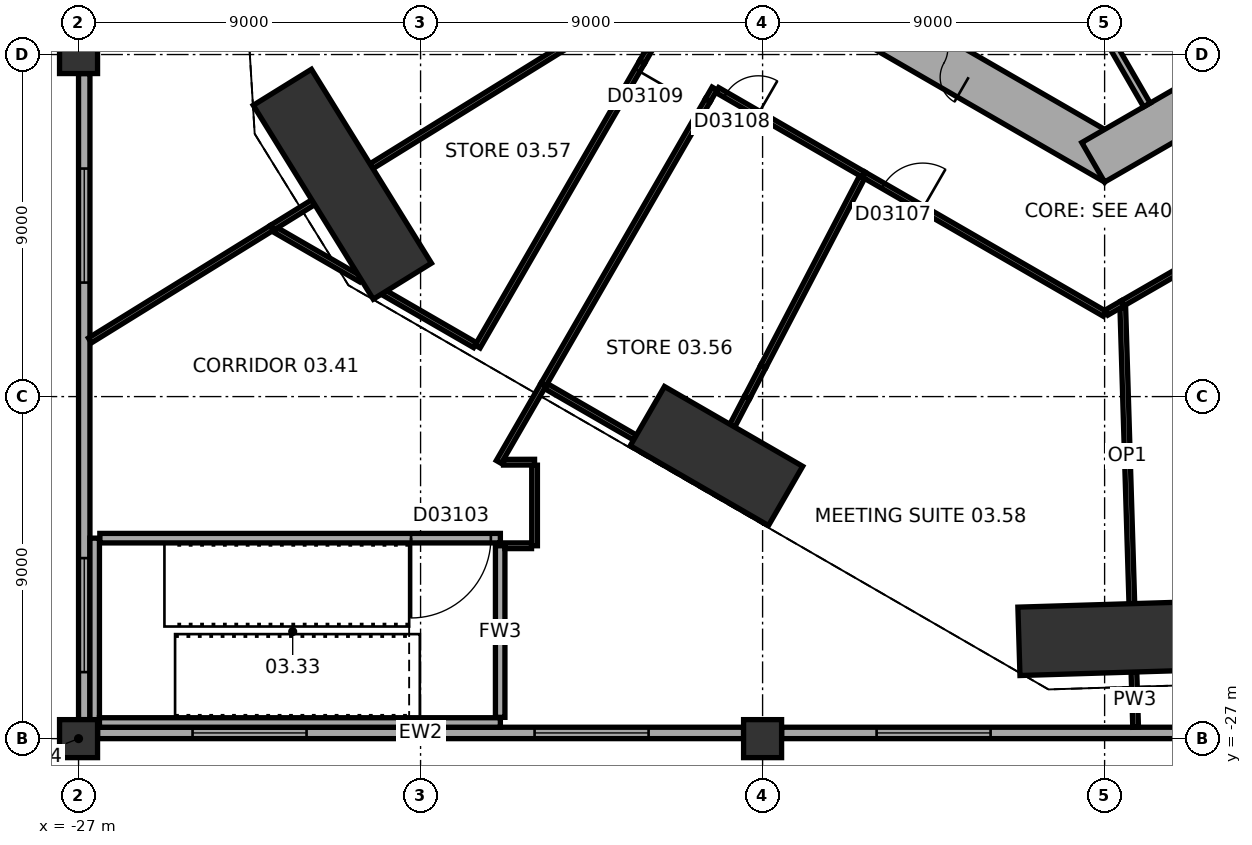
"""IFC4 building model, lengths in metres.
Left out: names, types, materials, properties, quantities, classifications, styles, units other than length and angle.
Written with IfcOpenShell. Run it as: python <this file> out.ifc"""

import sys

from ifc_helpers import new_model, si_unit, direction, frame, frame_2d, origin, origin_2d, place, context, subcontext, project, spatial, rectangle, extrude, element, fill, save


model = new_model("IFC4")
c1 = context("Model", 3, precision=1e-05, world=origin(), true_north=direction((0.0, 1.0)))
c2 = subcontext(c1, "Body", "Model", "MODEL_VIEW")
j1 = project(units=[si_unit("LENGTHUNIT", "METRE"), si_unit("PLANEANGLEUNIT", "RADIAN")], contexts=[c1])
p1 = place(None, origin())
s1 = spatial("IfcSite", under=j1, at=p1, CompositionType="ELEMENT")
p2 = place(p1, origin())
s2 = spatial("IfcBuilding", under=s1, at=p2, CompositionType="ELEMENT")
p3 = place(p2, frame((0.0, 0.0, 21.0)))
s3 = spatial("IfcBuildingStorey", under=s2, at=p3, CompositionType="ELEMENT", Elevation=21.0)
p4 = place(p3, frame((-20.058, -12.413, 0.0), z_axis=(0.0, 0.0, 1.0), x_axis=(0.526202050444, -0.850359572245, 0.0)))
e1 = element("IfcColumn", 1, at=p4, inside=s3, PredefinedType="COLUMN", context=c2, shape_type="SweptSolid", body=[
    extrude(rectangle(XDim=6.0, YDim=1.8, at=origin_2d()), origin(), (0.0, 0.0, 1.0), 8.0),
])
p5 = place(p3, frame((-10.213, -19.564, 0.0), z_axis=(0.0, 0.0, 1.0), x_axis=(0.866028021766, -0.499995465495, 0.0)))
e2 = element("IfcColumn", 2, at=p5, inside=s3, PredefinedType="COLUMN", context=c2, shape_type="SweptSolid", body=[
    extrude(rectangle(XDim=4.2, YDim=1.8, at=origin_2d()), origin(), (0.0, 0.0, 1.0), 8.0),
])
p6 = place(p3, frame((0.744, -24.348, 0.0), z_axis=(0.0, 0.0, 1.0), x_axis=(0.999533484231, 0.03054200224, 0.0)))
e3 = element("IfcColumn", 3, at=p6, inside=s3, PredefinedType="COLUMN", context=c2, shape_type="SweptSolid", body=[
    extrude(rectangle(XDim=6.0, YDim=1.8, at=origin_2d()), origin(), (0.0, 0.0, 1.0), 8.0),
])
for number, where, z_axis, x_axis in (
    (4, (-27.0, -27.0, 0.0), (0.0, 0.0, 1.0), (1.0, 0.0, 0.0)),
    (5, (-27.0, -9.0, 0.0), (0.0, 0.0, 1.0), (1.0, 0.0, 0.0)),
    (6, (-9.0, -27.0, 0.0), (0.0, 0.0, 1.0), (1.0, 0.0, 0.0)),
):
    element("IfcColumn", number, at=place(p3, frame(where, z_axis=z_axis, x_axis=x_axis)), inside=s3, PredefinedType="COLUMN", context=c2, shape_type="SweptSolid", body=[
        extrude(rectangle(XDim=1.0, YDim=1.0, at=origin_2d()), origin(), (0.0, 0.0, 1.0), 8.0),
    ])
p7 = place(p3, frame((-10.4, -5.658, 0.0), z_axis=(0.0, 0.0, 1.0), x_axis=(0.866021384402, -0.500006961711, 0.0)))
e7 = element("IfcWall", 7, at=p7, inside=s3, PredefinedType="SHEAR", context=c2, shape_type="SweptSolid", body=[
    extrude(rectangle(XDim=12.355, YDim=1.2, at=frame_2d((6.178, 0.0))), origin(), (0.0, 0.0, 1.0), 8.0),
])
p8 = place(p7, frame((6.378, 0.0, 0.0)))
e8 = element("IfcOpeningElement", 8, at=p8, cuts=e7, PredefinedType="OPENING", context=c2, shape_type="SweptSolid", body=[
    extrude(rectangle(XDim=1.5, YDim=2.1, at=frame_2d((0.75, 1.05))), frame((0.0, 0.61, 0.0), z_axis=(0.0, -1.0, 0.0), x_axis=(1.0, 0.0, 0.0)), (0.0, 0.0, 1.0), 1.22),
])
p9 = place(p7, frame((3.228, 0.0, 0.0)))
e9 = element("IfcOpeningElement", 9, at=p9, cuts=e7, PredefinedType="OPENING", context=c2, shape_type="SweptSolid", body=[
    extrude(rectangle(XDim=0.9, YDim=2.1, at=frame_2d((0.45, 1.05))), frame((0.0, 0.61, 0.0), z_axis=(0.0, -1.0, 0.0), x_axis=(1.0, 0.0, 0.0)), (0.0, 0.0, 1.0), 1.22),
])
p10 = place(p3, frame((-0.3, -11.836, 0.0), z_axis=(0.0, 0.0, 1.0), x_axis=(0.866021384402, 0.500006961711, 0.0)))
e10 = element("IfcWall", 10, at=p10, inside=s3, PredefinedType="SHEAR", context=c2, shape_type="SweptSolid", body=[
    extrude(rectangle(XDim=12.355, YDim=1.2, at=frame_2d((6.178, 0.0))), origin(), (0.0, 0.0, 1.0), 8.0),
])
p11 = place(p10, frame((4.128, 0.0, 0.0)))
e11 = element("IfcOpeningElement", 11, at=p11, cuts=e10, PredefinedType="OPENING", context=c2, shape_type="SweptSolid", body=[
    extrude(rectangle(XDim=0.9, YDim=2.1, at=frame_2d((0.45, 1.05))), frame((0.0, 0.61, 0.0), z_axis=(0.0, -1.0, 0.0), x_axis=(1.0, 0.0, 0.0)), (0.0, 0.0, 1.0), 1.22),
])
p12 = place(p10, frame((7.928, 0.0, 0.0)))
e12 = element("IfcOpeningElement", 12, at=p12, cuts=e10, PredefinedType="OPENING", context=c2, shape_type="SweptSolid", body=[
    extrude(rectangle(XDim=1.1, YDim=2.1, at=frame_2d((0.55, 1.05))), frame((0.0, 0.61, 0.0), z_axis=(0.0, -1.0, 0.0), x_axis=(1.0, 0.0, 0.0)), (0.0, 0.0, 1.0), 1.22),
])
p13 = place(p3, frame((-26.5, -26.85, 0.0), z_axis=(0.0, 0.0, 1.0), x_axis=(1.0, 0.0, 0.0)))
e13 = element("IfcWall", 13, at=p13, inside=s3, PredefinedType="STANDARD", context=c2, shape_type="SweptSolid", body=[
    extrude(rectangle(XDim=17.0, YDim=0.3, at=frame_2d((8.5, 0.0))), origin(), (0.0, 0.0, 1.0), 6.5),
])
p14 = place(p13, frame((2.5, 0.0, 1.0)))
e14 = element("IfcOpeningElement", 14, at=p14, cuts=e13, PredefinedType="OPENING", context=c2, shape_type="SweptSolid", body=[
    extrude(rectangle(XDim=3.0, YDim=4.0, at=frame_2d((1.5, 2.0))), frame((0.0, 0.16, 0.0), z_axis=(0.0, -1.0, 0.0), x_axis=(1.0, 0.0, 0.0)), (0.0, 0.0, 1.0), 0.32),
])
p15 = place(p13, frame((11.5, 0.0, 1.0)))
e15 = element("IfcOpeningElement", 15, at=p15, cuts=e13, PredefinedType="OPENING", context=c2, shape_type="SweptSolid", body=[
    extrude(rectangle(XDim=3.0, YDim=4.0, at=frame_2d((1.5, 2.0))), frame((0.0, 0.16, 0.0), z_axis=(0.0, -1.0, 0.0), x_axis=(1.0, 0.0, 0.0)), (0.0, 0.0, 1.0), 0.32),
])
p16 = place(p3, frame((-8.5, -26.85, 0.0), z_axis=(0.0, 0.0, 1.0), x_axis=(1.0, 0.0, 0.0)))
e16 = element("IfcWall", 16, at=p16, inside=s3, PredefinedType="STANDARD", context=c2, shape_type="SweptSolid", body=[
    extrude(rectangle(XDim=17.0, YDim=0.3, at=frame_2d((8.5, 0.0))), origin(), (0.0, 0.0, 1.0), 6.5),
])
p17 = place(p16, frame((2.5, 0.0, 1.0)))
e17 = element("IfcOpeningElement", 17, at=p17, cuts=e16, PredefinedType="OPENING", context=c2, shape_type="SweptSolid", body=[
    extrude(rectangle(XDim=3.0, YDim=4.0, at=frame_2d((1.5, 2.0))), frame((0.0, 0.16, 0.0), z_axis=(0.0, -1.0, 0.0), x_axis=(1.0, 0.0, 0.0)), (0.0, 0.0, 1.0), 0.32),
])
p18 = place(p16, frame((11.5, 0.0, 1.0)))
e18 = element("IfcOpeningElement", 18, at=p18, cuts=e16, PredefinedType="OPENING", context=c2, shape_type="SweptSolid", body=[
    extrude(rectangle(XDim=3.0, YDim=4.0, at=frame_2d((1.5, 2.0))), frame((0.0, 0.16, 0.0), z_axis=(0.0, -1.0, 0.0), x_axis=(1.0, 0.0, 0.0)), (0.0, 0.0, 1.0), 0.32),
])
p19 = place(p3, frame((-26.85, -9.5, 0.0), z_axis=(0.0, 0.0, 1.0), x_axis=(0.0, -1.0, 0.0)))
e19 = element("IfcWall", 19, at=p19, inside=s3, PredefinedType="STANDARD", context=c2, shape_type="SweptSolid", body=[
    extrude(rectangle(XDim=17.0, YDim=0.3, at=frame_2d((8.5, 0.0))), origin(), (0.0, 0.0, 1.0), 6.5),
])
p20 = place(p19, frame((2.5, 0.0, 1.0)))
e20 = element("IfcOpeningElement", 20, at=p20, cuts=e19, PredefinedType="OPENING", context=c2, shape_type="SweptSolid", body=[
    extrude(rectangle(XDim=3.0, YDim=4.0, at=frame_2d((1.5, 2.0))), frame((0.0, 0.16, 0.0), z_axis=(0.0, -1.0, 0.0), x_axis=(1.0, 0.0, 0.0)), (0.0, 0.0, 1.0), 0.32),
])
p21 = place(p19, frame((12.75, 0.0, 1.0)))
e21 = element("IfcOpeningElement", 21, at=p21, cuts=e19, PredefinedType="OPENING", context=c2, shape_type="SweptSolid", body=[
    extrude(rectangle(XDim=3.0, YDim=4.0, at=frame_2d((1.5, 2.0))), frame((0.0, 0.16, 0.0), z_axis=(0.0, -1.0, 0.0), x_axis=(1.0, 0.0, 0.0)), (0.0, 0.0, 1.0), 0.32),
])
p22 = place(p3, frame((0.013, -8.422, 0.0), z_axis=(0.0, 0.0, 1.0), x_axis=(0.500077893725, -0.86598042715, 0.0)))
e22 = element("IfcWall", 22, at=p22, inside=s3, PredefinedType="PARTITIONING", context=c2, shape_type="SweptSolid", body=[
    extrude(rectangle(XDim=2.2, YDim=0.2, at=frame_2d((1.1, 0.0))), origin(), (0.0, 0.0, 1.0), 7.7),
])
p23 = place(p3, frame((-15.905, -26.44, 0.0), z_axis=(0.0, 0.0, 1.0), x_axis=(0.0, 1.0, 0.0)))
e23 = element("IfcWall", 23, at=p23, inside=s3, PredefinedType="SOLIDWALL", context=c2, shape_type="SweptSolid", body=[
    extrude(rectangle(XDim=4.515, YDim=0.25, at=frame_2d((2.257, 0.0))), origin(), (0.0, 0.0, 1.0), 7.7),
])
p24 = place(p3, frame((0.771, -25.248, 0.0), z_axis=(0.0, 0.0, 1.0), x_axis=(0.030584206332, -0.99953219374, 0.0)))
e24 = element("IfcWall", 24, at=p24, inside=s3, PredefinedType="PARTITIONING", context=c2, shape_type="SweptSolid", body=[
    extrude(rectangle(XDim=1.453, YDim=0.15, at=frame_2d((0.727, 0.0))), origin(), (0.0, 0.0, 1.0), 7.7),
])
p25 = place(p3, frame((-15.08, -21.925, 0.0), z_axis=(0.0, 0.0, 1.0), x_axis=(-1.0, 0.0, 0.0)))
e25 = element("IfcWall", 25, at=p25, inside=s3, PredefinedType="PARTITIONING", context=c2, shape_type="SweptSolid", body=[
    extrude(rectangle(XDim=0.7, YDim=0.15, at=frame_2d((0.35, 0.0))), origin(), (0.0, 0.0, 1.0), 7.7),
])
p26 = place(p3, frame((-26.44, -21.725, 0.0), z_axis=(0.0, 0.0, 1.0), x_axis=(1.0, 0.0, 0.0)))
e26 = element("IfcWall", 26, at=p26, inside=s3, PredefinedType="SOLIDWALL", context=c2, shape_type="SweptSolid", body=[
    extrude(rectangle(XDim=10.54, YDim=0.25, at=frame_2d((5.27, 0.0))), origin(), (0.0, 0.0, 1.0), 7.7),
])
p27 = place(p26, frame((8.19, 0.0, 0.0)))
e27 = element("IfcOpeningElement", 27, at=p27, cuts=e26, PredefinedType="OPENING", context=c2, shape_type="SweptSolid", body=[
    extrude(rectangle(XDim=2.1, YDim=2.4, at=frame_2d((1.05, 1.2))), frame((0.0, 0.135, 0.0), z_axis=(0.0, -1.0, 0.0), x_axis=(1.0, 0.0, 0.0)), (0.0, 0.0, 1.0), 0.27),
])
p28 = place(p3, frame((-15.0, -19.805, 0.0), z_axis=(0.0, 0.0, 1.0), x_axis=(0.0, -1.0, 0.0)))
e28 = element("IfcWall", 28, at=p28, inside=s3, PredefinedType="PARTITIONING", context=c2, shape_type="SweptSolid", body=[
    extrude(rectangle(XDim=2.12, YDim=0.15, at=frame_2d((1.06, 0.0))), origin(), (0.0, 0.0, 1.0), 7.7),
])
p29 = place(p3, frame((-15.817, -19.727, 0.0), z_axis=(0.0, 0.0, 1.0), x_axis=(0.99999781167, 0.002092045631, 0.0)))
e29 = element("IfcWall", 29, at=p29, inside=s3, PredefinedType="PARTITIONING", context=c2, shape_type="SweptSolid", body=[
    extrude(rectangle(XDim=0.817, YDim=0.15, at=frame_2d((0.408, 0.0))), origin(), (0.0, 0.0, 1.0), 7.7),
])
p30 = place(p3, frame((-12.357, -19.077, 0.0), z_axis=(0.0, 0.0, 1.0), x_axis=(-0.866044168464, 0.499967497213, 0.0)))
e30 = element("IfcWall", 30, at=p30, inside=s3, PredefinedType="PARTITIONING", context=c2, shape_type="SweptSolid", body=[
    extrude(rectangle(XDim=2.702, YDim=0.15, at=frame_2d((1.351, 0.0))), origin(), (0.0, 0.0, 1.0), 6.2),
])
p31 = place(p3, frame((-9.41, -18.025, 0.0), z_axis=(0.0, 0.0, 1.0), x_axis=(-0.462925528534, -0.886397176796, 0.0)))
e31 = element("IfcWall", 31, at=p31, inside=s3, PredefinedType="PARTITIONING", context=c2, shape_type="SweptSolid", body=[
    extrude(rectangle(XDim=0.835, YDim=0.15, at=frame_2d((0.418, 0.0))), origin(), (0.0, 0.0, 1.0), 7.7),
])
p32 = place(p3, frame((-14.766, -17.685, 0.0), z_axis=(0.0, 0.0, 1.0), x_axis=(-0.500339908207, -0.865829068729, 0.0)))
e32 = element("IfcWall", 32, at=p32, inside=s3, PredefinedType="PARTITIONING", context=c2, shape_type="SweptSolid", body=[
    extrude(rectangle(XDim=2.35, YDim=0.15, at=frame_2d((1.175, 0.0))), origin(), (0.0, 0.0, 1.0), 7.7),
])
p33 = place(p3, frame((-8.981, -17.204, 0.0), z_axis=(0.0, 0.0, 1.0), x_axis=(-0.462737010981, -0.886495605555, 0.0)))
e33 = element("IfcWall", 33, at=p33, inside=s3, PredefinedType="PARTITIONING", context=c2, shape_type="SweptSolid", body=[
    extrude(rectangle(XDim=0.927, YDim=0.15, at=frame_2d((0.463, 0.0))), origin(), (0.0, 0.0, 1.0), 7.7),
])
p34 = place(p3, frame((-16.568, -16.646, 0.0), z_axis=(0.0, 0.0, 1.0), x_axis=(-0.866023907196, 0.500002592159, 0.0)))
e34 = element("IfcWall", 34, at=p34, inside=s3, PredefinedType="PARTITIONING", context=c2, shape_type="SweptSolid", body=[
    extrude(rectangle(XDim=2.766, YDim=0.15, at=frame_2d((1.383, 0.0))), origin(), (0.0, 0.0, 1.0), 6.2),
])
p35 = place(p3, frame((0.0, -15.82, 0.0), z_axis=(0.0, 0.0, 1.0), x_axis=(-0.866018019704, 0.500012789385, 0.0)))
e35 = element("IfcWall", 35, at=p35, inside=s3, PredefinedType="PARTITIONING", context=c2, shape_type="SweptSolid", body=[
    extrude(rectangle(XDim=7.327, YDim=0.15, at=frame_2d((3.664, 0.0))), origin(), (0.0, 0.0, 1.0), 7.7),
])
p36 = place(p35, frame((5.527, 0.0, 0.0)))
e36 = element("IfcOpeningElement", 36, at=p36, cuts=e35, PredefinedType="OPENING", context=c2, shape_type="SweptSolid", body=[
    extrude(rectangle(XDim=1.2, YDim=2.1, at=frame_2d((0.6, 1.05))), frame((0.0, 0.085, 0.0), z_axis=(0.0, -1.0, 0.0), x_axis=(1.0, 0.0, 0.0)), (0.0, 0.0, 1.0), 0.17),
])
p37 = place(p3, frame((0.479, -15.665, 0.0), z_axis=(0.0, 0.0, 1.0), x_axis=(0.030535907252, -0.999533670453, 0.0)))
e37 = element("IfcWall", 37, at=p37, inside=s3, PredefinedType="MOVABLE", context=c2, shape_type="SweptSolid", body=[
    extrude(rectangle(XDim=7.787, YDim=0.15, at=frame_2d((3.894, 0.0))), origin(), (0.0, 0.0, 1.0), 7.7),
])
p38 = place(p3, frame((0.475, -15.545, 0.0), z_axis=(0.0, 0.0, 1.0), x_axis=(0.866021168401, 0.500007335828, 0.0)))
e38 = element("IfcWall", 38, at=p38, inside=s3, PredefinedType="PARTITIONING", context=c2, shape_type="SweptSolid", body=[
    extrude(rectangle(XDim=7.616, YDim=0.15, at=frame_2d((3.808, 0.0))), origin(), (0.0, 0.0, 1.0), 7.7),
])
p39 = place(p3, frame((0.475, -15.545, 0.0), z_axis=(0.0, 0.0, 1.0), x_axis=(-0.865927594567, -0.50016937228, 0.0)))
e39 = element("IfcWall", 39, at=p39, inside=s3, PredefinedType="PARTITIONING", context=c2, shape_type="SweptSolid", body=[
    extrude(rectangle(XDim=0.489, YDim=0.15, at=frame_2d((0.244, 0.0))), origin(), (0.0, 0.0, 1.0), 7.7),
])
p40 = place(p3, frame((-19.569, -14.913, 0.0), z_axis=(0.0, 0.0, 1.0), x_axis=(-0.86602679452, 0.499997591167, 0.0)))
e40 = element("IfcWall", 40, at=p40, inside=s3, PredefinedType="PARTITIONING", context=c2, shape_type="SweptSolid", body=[
    extrude(rectangle(XDim=2.586, YDim=0.15, at=frame_2d((1.293, 0.0))), origin(), (0.0, 0.0, 1.0), 7.7),
])
p41 = place(p3, frame((-21.913, -13.56, 0.0), z_axis=(0.0, 0.0, 1.0), x_axis=(-0.850348316199, -0.526220240145, 0.0)))
e41 = element("IfcWall", 41, at=p41, inside=s3, PredefinedType="PARTITIONING", context=c2, shape_type="SweptSolid", body=[
    extrude(rectangle(XDim=5.63, YDim=0.15, at=frame_2d((2.815, 0.0))), origin(), (0.0, 0.0, 1.0), 7.7),
])
p42 = place(p3, frame((-21.909, -13.557, 0.0), z_axis=(0.0, 0.0, 1.0), x_axis=(0.850354848775, 0.526209683648, 0.0)))
e42 = element("IfcWall", 42, at=p42, inside=s3, PredefinedType="PARTITIONING", context=c2, shape_type="SweptSolid", body=[
    extrude(rectangle(XDim=1.276, YDim=0.15, at=frame_2d((0.638, 0.0))), origin(), (0.0, 0.0, 1.0), 7.7),
])
p43 = place(p3, frame((-6.383, -12.227, 0.0), z_axis=(0.0, 0.0, 1.0), x_axis=(-0.462817144884, -0.886453772287, 0.0)))
e43 = element("IfcWall", 43, at=p43, inside=s3, PredefinedType="PARTITIONING", context=c2, shape_type="SweptSolid", body=[
    extrude(rectangle(XDim=5.614, YDim=0.15, at=frame_2d((2.807, 0.0))), origin(), (0.0, 0.0, 1.0), 7.7),
])
p44 = place(p3, frame((-6.346, -12.156, 0.0), z_axis=(0.0, 0.0, 1.0), x_axis=(-0.866016305155, 0.500015758957, 0.0)))
e44 = element("IfcWall", 44, at=p44, inside=s3, PredefinedType="PARTITIONING", context=c2, shape_type="SweptSolid", body=[
    extrude(rectangle(XDim=4.443, YDim=0.15, at=frame_2d((2.222, 0.0))), origin(), (0.0, 0.0, 1.0), 7.7),
])
p45 = place(p44, frame((3.194, 0.0, 0.0)))
e45 = element("IfcOpeningElement", 45, at=p45, cuts=e44, PredefinedType="OPENING", context=c2, shape_type="SweptSolid", body=[
    extrude(rectangle(XDim=1.0, YDim=2.1, at=frame_2d((0.5, 1.05))), frame((0.0, 0.085, 0.0), z_axis=(0.0, -1.0, 0.0), x_axis=(1.0, 0.0, 0.0)), (0.0, 0.0, 1.0), 0.17),
])
p46 = place(p3, frame((-19.293, -11.939, 0.0), z_axis=(0.0, 0.0, 1.0), x_axis=(0.850368954936, 0.526186887408, 0.0)))
e46 = element("IfcWall", 46, at=p46, inside=s3, PredefinedType="PARTITIONING", context=c2, shape_type="SweptSolid", body=[
    extrude(rectangle(XDim=7.016, YDim=0.15, at=frame_2d((3.508, 0.0))), origin(), (0.0, 0.0, 1.0), 7.7),
])
p47 = place(p3, frame((-10.438, -10.198, 0.0), z_axis=(0.0, 0.0, 1.0), x_axis=(-0.500407402803, -0.865790061862, 0.0)))
e47 = element("IfcWall", 47, at=p47, inside=s3, PredefinedType="PARTITIONING", context=c2, shape_type="SweptSolid", body=[
    extrude(rectangle(XDim=8.648, YDim=0.15, at=frame_2d((4.324, 0.0))), origin(), (0.0, 0.0, 1.0), 7.7),
])
p48 = place(p3, frame((-10.263, -9.894, 0.0), z_axis=(0.0, 0.0, 1.0), x_axis=(-0.500706819963, -0.865616936319, 0.0)))
e48 = element("IfcWall", 48, at=p48, inside=s3, PredefinedType="PARTITIONING", context=c2, shape_type="SweptSolid", body=[
    extrude(rectangle(XDim=0.351, YDim=0.15, at=frame_2d((0.175, 0.0))), origin(), (0.0, 0.0, 1.0), 7.7),
])
p49 = place(p3, frame((-12.17, -9.197, 0.0), z_axis=(0.0, 0.0, 1.0), x_axis=(-0.500567740603, -0.865697370371, 0.0)))
e49 = element("IfcWall", 49, at=p49, inside=s3, PredefinedType="PARTITIONING", context=c2, shape_type="SweptSolid", body=[
    extrude(rectangle(XDim=8.649, YDim=0.15, at=frame_2d((4.324, 0.0))), origin(), (0.0, 0.0, 1.0), 7.7),
])
p50 = place(p49, frame((0.25, 0.0, 0.0)))
e50 = element("IfcOpeningElement", 50, at=p50, cuts=e49, PredefinedType="OPENING", context=c2, shape_type="SweptSolid", body=[
    extrude(rectangle(XDim=1.0, YDim=2.1, at=frame_2d((0.5, 1.05))), frame((0.0, 0.085, 0.0), z_axis=(0.0, -1.0, 0.0), x_axis=(1.0, 0.0, 0.0)), (0.0, 0.0, 1.0), 0.17),
])
p51 = place(p3, frame((-12.17, -9.197, 0.0), z_axis=(0.0, 0.0, 1.0), x_axis=(0.500347451303, 0.865824709727, 0.0)))
e51 = element("IfcWall", 51, at=p51, inside=s3, PredefinedType="PARTITIONING", context=c2, shape_type="SweptSolid", body=[
    extrude(rectangle(XDim=0.349, YDim=0.15, at=frame_2d((0.175, 0.0))), origin(), (0.0, 0.0, 1.0), 7.7),
])
p52 = place(p3, frame((-26.575, -21.725, 0.0), z_axis=(0.0, 0.0, 1.0), x_axis=(0.0, -1.0, 0.0)))
e52 = element("IfcWall", 52, at=p52, inside=s3, PredefinedType="SOLIDWALL", context=c2, shape_type="SweptSolid", body=[
    extrude(rectangle(XDim=4.975, YDim=0.25, at=frame_2d((2.487, 0.0))), origin(), (0.0, 0.0, 1.0), 7.7),
])
p53 = place(p3, frame((-26.45, -26.575, 0.0), z_axis=(0.0, 0.0, 1.0), x_axis=(1.0, 0.0, 0.0)))
e53 = element("IfcWall", 53, at=p53, inside=s3, PredefinedType="SOLIDWALL", context=c2, shape_type="SweptSolid", body=[
    extrude(rectangle(XDim=10.55, YDim=0.25, at=frame_2d((5.275, 0.0))), origin(), (0.0, 0.0, 1.0), 7.7),
])
p54 = place(p14, origin())
e54 = element("IfcWindow", 54, at=p54, inside=s3, PartitioningType="SINGLE_PANEL", PredefinedType="WINDOW", context=c2, shape_type="SweptSolid", body=[
    extrude(rectangle(XDim=3.0, YDim=4.0, at=frame_2d((1.5, 2.0))), frame((0.0, 0.03, 0.0), z_axis=(0.0, -1.0, 0.0), x_axis=(1.0, 0.0, 0.0)), (0.0, 0.0, 1.0), 0.06),
])
fill(e14, e54)
p55 = place(p15, origin())
e55 = element("IfcWindow", 55, at=p55, inside=s3, PartitioningType="SINGLE_PANEL", PredefinedType="WINDOW", context=c2, shape_type="SweptSolid", body=[
    extrude(rectangle(XDim=3.0, YDim=4.0, at=frame_2d((1.5, 2.0))), frame((0.0, 0.03, 0.0), z_axis=(0.0, -1.0, 0.0), x_axis=(1.0, 0.0, 0.0)), (0.0, 0.0, 1.0), 0.06),
])
fill(e15, e55)
p56 = place(p17, origin())
e56 = element("IfcWindow", 56, at=p56, inside=s3, PartitioningType="SINGLE_PANEL", PredefinedType="WINDOW", context=c2, shape_type="SweptSolid", body=[
    extrude(rectangle(XDim=3.0, YDim=4.0, at=frame_2d((1.5, 2.0))), frame((0.0, 0.03, 0.0), z_axis=(0.0, -1.0, 0.0), x_axis=(1.0, 0.0, 0.0)), (0.0, 0.0, 1.0), 0.06),
])
fill(e17, e56)
p57 = place(p20, origin())
e57 = element("IfcWindow", 57, at=p57, inside=s3, PartitioningType="SINGLE_PANEL", PredefinedType="WINDOW", context=c2, shape_type="SweptSolid", body=[
    extrude(rectangle(XDim=3.0, YDim=4.0, at=frame_2d((1.5, 2.0))), frame((0.0, 0.03, 0.0), z_axis=(0.0, -1.0, 0.0), x_axis=(1.0, 0.0, 0.0)), (0.0, 0.0, 1.0), 0.06),
])
fill(e20, e57)
p58 = place(p21, origin())
e58 = element("IfcWindow", 58, at=p58, inside=s3, PartitioningType="SINGLE_PANEL", PredefinedType="WINDOW", context=c2, shape_type="SweptSolid", body=[
    extrude(rectangle(XDim=3.0, YDim=4.0, at=frame_2d((1.5, 2.0))), frame((0.0, 0.03, 0.0), z_axis=(0.0, -1.0, 0.0), x_axis=(1.0, 0.0, 0.0)), (0.0, 0.0, 1.0), 0.06),
])
fill(e21, e58)
p59 = place(p8, origin())
e59 = element("IfcDoor", 59, at=p59, inside=s3, OperationType="DOUBLE_DOOR_SINGLE_SWING", PredefinedType="DOOR", context=c2, shape_type="SweptSolid", body=[
    extrude(rectangle(XDim=1.5, YDim=2.1, at=frame_2d((0.75, 1.05))), frame((0.0, 0.025, 0.0), z_axis=(0.0, -1.0, 0.0), x_axis=(1.0, 0.0, 0.0)), (0.0, 0.0, 1.0), 0.05),
])
fill(e8, e59)
p60 = place(p27, frame((2.1, 0.0, 0.0), z_axis=(0.0, 0.0, 1.0), x_axis=(-1.0, 0.0, 0.0)))
e60 = element("IfcDoor", 60, at=p60, inside=s3, OperationType="DOUBLE_DOOR_SINGLE_SWING", PredefinedType="DOOR", context=c2, shape_type="SweptSolid", body=[
    extrude(rectangle(XDim=2.1, YDim=2.4, at=frame_2d((1.05, 1.2))), frame((0.0, 0.025, 0.0), z_axis=(0.0, -1.0, 0.0), x_axis=(1.0, 0.0, 0.0)), (0.0, 0.0, 1.0), 0.05),
])
fill(e27, e60)
p61 = place(p36, origin())
e61 = element("IfcDoor", 61, at=p61, inside=s3, OperationType="SINGLE_SWING_LEFT", PredefinedType="DOOR", context=c2, shape_type="SweptSolid", body=[
    extrude(rectangle(XDim=1.2, YDim=2.1, at=frame_2d((0.6, 1.05))), frame((0.0, 0.025, 0.0), z_axis=(0.0, -1.0, 0.0), x_axis=(1.0, 0.0, 0.0)), (0.0, 0.0, 1.0), 0.05),
])
fill(e36, e61)
p62 = place(p45, origin())
e62 = element("IfcDoor", 62, at=p62, inside=s3, OperationType="SINGLE_SWING_LEFT", PredefinedType="DOOR", context=c2, shape_type="SweptSolid", body=[
    extrude(rectangle(XDim=1.0, YDim=2.1, at=frame_2d((0.5, 1.05))), frame((0.0, 0.025, 0.0), z_axis=(0.0, -1.0, 0.0), x_axis=(1.0, 0.0, 0.0)), (0.0, 0.0, 1.0), 0.05),
])
fill(e45, e62)
p63 = place(p50, origin())
e63 = element("IfcDoor", 63, at=p63, inside=s3, OperationType="SINGLE_SWING_LEFT", PredefinedType="DOOR", context=c2, shape_type="SweptSolid", body=[
    extrude(rectangle(XDim=1.0, YDim=2.1, at=frame_2d((0.5, 1.05))), frame((0.0, 0.025, 0.0), z_axis=(0.0, -1.0, 0.0), x_axis=(1.0, 0.0, 0.0)), (0.0, 0.0, 1.0), 0.05),
])
fill(e50, e63)
save(model, sys.argv[1])
